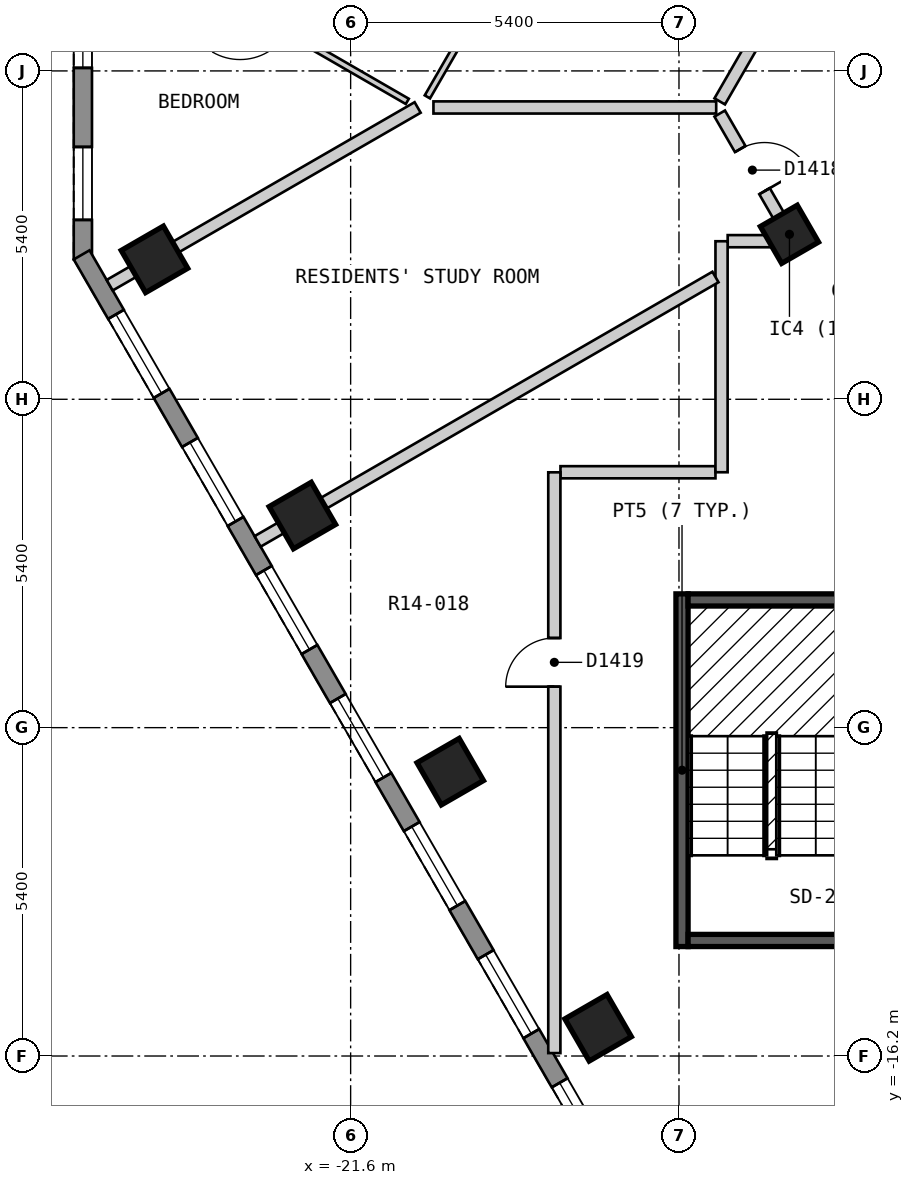
"""IFC4 building model, lengths in metres.
Left out: names, types, materials, properties, quantities, classifications, styles, units other than length and angle.
Written with IfcOpenShell. Run it as: python <this file> out.ifc"""

import sys

from ifc_helpers import new_model, si_unit, direction, frame, frame_2d, origin, origin_2d, place, context, subcontext, project, spatial, polyline, rectangle, outline, extrude, element, fill, save


model = new_model("IFC4")
c1 = context("Model", 3, precision=1e-05, world=origin(), true_north=direction((0.0, 1.0)))
c2 = subcontext(c1, "Body", "Model", "MODEL_VIEW")
j1 = project(units=[si_unit("LENGTHUNIT", "METRE"), si_unit("PLANEANGLEUNIT", "RADIAN")], contexts=[c1])
p1 = place(None, origin())
s1 = spatial("IfcSite", under=j1, at=p1, CompositionType="ELEMENT")
p2 = place(p1, origin())
s2 = spatial("IfcBuilding", under=s1, at=p2, CompositionType="ELEMENT")
p3 = place(p2, frame((0.0, 0.0, 166.2)))
s3 = spatial("IfcBuildingStorey", under=s2, at=p3, CompositionType="ELEMENT", Elevation=166.2)
for number, where, z_axis, x_axis in (
    (1, (-24.826, -3.099, 0.0), (0.0, 0.0, 1.0), (0.5, -0.866, 0.0)),
    (2, (-22.394, -7.312, 0.0), (0.0, 0.0, 1.0), (0.5, -0.866, 0.0)),
    (3, (-19.962, -11.524, 0.0), (0.0, 0.0, 1.0), (0.5, -0.866, 0.0)),
    (4, (-17.53, -15.736, 0.0), (0.0, 0.0, 1.0), (0.5, -0.866, 0.0)),
):
    element("IfcColumn", number, at=place(p3, frame(where, z_axis=z_axis, x_axis=x_axis)), inside=s3, PredefinedType="COLUMN", context=c2, shape_type="SweptSolid", body=[
        extrude(rectangle(XDim=0.8, YDim=0.8, at=origin_2d()), origin(), (0.0, 0.0, 1.0), 3.0),
    ])
p4 = place(p3, frame((-14.383, -2.687, 0.0), z_axis=(0.0, 0.0, 1.0), x_axis=(0.5, -0.866025403784, 0.0)))
e5 = element("IfcColumn", 5, at=p4, inside=s3, PredefinedType="COLUMN", context=c2, shape_type="SweptSolid", body=[
    extrude(rectangle(XDim=0.7, YDim=0.7, at=origin_2d()), origin(), (0.0, 0.0, 1.0), 3.0),
])
p5 = place(p3, frame((-26.004, 1.9, 0.0), z_axis=(0.0, 0.0, 1.0), x_axis=(0.0, -1.0, 0.0)))
e6 = element("IfcWall", 6, at=p5, inside=s3, PredefinedType="SOLIDWALL", context=c2, shape_type="SweptSolid", body=[
    extrude(outline(polyline([(0.0, -0.15), (5.0, -0.15), (4.92, 0.15), (0.08, 0.15), (0.0, -0.15)])), origin(), (0.0, 0.0, 1.0), 2.7),
])
p6 = place(p5, frame((0.65, 0.0, 0.15)))
e7 = element("IfcOpeningElement", 7, at=p6, cuts=e6, PredefinedType="OPENING", context=c2, shape_type="SweptSolid", body=[
    extrude(rectangle(XDim=1.2, YDim=2.1, at=frame_2d((0.6, 1.05))), frame((0.0, 0.16, 0.0), z_axis=(0.0, -1.0, 0.0), x_axis=(1.0, 0.0, 0.0)), (0.0, 0.0, 1.0), 0.32),
])
p7 = place(p5, frame((3.15, 0.0, 0.15)))
e8 = element("IfcOpeningElement", 8, at=p7, cuts=e6, PredefinedType="OPENING", context=c2, shape_type="SweptSolid", body=[
    extrude(rectangle(XDim=1.2, YDim=2.1, at=frame_2d((0.6, 1.05))), frame((0.0, 0.16, 0.0), z_axis=(0.0, -1.0, 0.0), x_axis=(1.0, 0.0, 0.0)), (0.0, 0.0, 1.0), 0.32),
])
p8 = place(p3, frame((-26.024, -3.025, 0.0), z_axis=(0.0, 0.0, 1.0), x_axis=(0.500018670445, -0.86601462413, 0.0)))
e9 = element("IfcWall", 9, at=p8, inside=s3, PredefinedType="SOLIDWALL", context=c2, shape_type="SweptSolid", body=[
    extrude(outline(polyline([(0.0, -0.15), (20.785, -0.15), (20.705, 0.15), (0.08, 0.15), (0.0, -0.15)])), origin(), (0.0, 0.0, 1.0), 2.7),
])
p9 = place(p8, frame((1.13, 0.0, 0.15)))
e10 = element("IfcOpeningElement", 10, at=p9, cuts=e9, PredefinedType="OPENING", context=c2, shape_type="SweptSolid", body=[
    extrude(rectangle(XDim=1.5, YDim=2.1, at=frame_2d((0.75, 1.05))), frame((0.0, 0.16, 0.0), z_axis=(0.0, -1.0, 0.0), x_axis=(1.0, 0.0, 0.0)), (0.0, 0.0, 1.0), 0.32),
])
p10 = place(p8, frame((3.562, 0.0, 0.15)))
e11 = element("IfcOpeningElement", 11, at=p10, cuts=e9, PredefinedType="OPENING", context=c2, shape_type="SweptSolid", body=[
    extrude(rectangle(XDim=1.5, YDim=2.1, at=frame_2d((0.75, 1.05))), frame((0.0, 0.16, 0.0), z_axis=(0.0, -1.0, 0.0), x_axis=(1.0, 0.0, 0.0)), (0.0, 0.0, 1.0), 0.32),
])
p11 = place(p8, frame((5.994, 0.0, 0.15)))
e12 = element("IfcOpeningElement", 12, at=p11, cuts=e9, PredefinedType="OPENING", context=c2, shape_type="SweptSolid", body=[
    extrude(rectangle(XDim=1.5, YDim=2.1, at=frame_2d((0.75, 1.05))), frame((0.0, 0.16, 0.0), z_axis=(0.0, -1.0, 0.0), x_axis=(1.0, 0.0, 0.0)), (0.0, 0.0, 1.0), 0.32),
])
p12 = place(p8, frame((8.425, 0.0, 0.15)))
e13 = element("IfcOpeningElement", 13, at=p12, cuts=e9, PredefinedType="OPENING", context=c2, shape_type="SweptSolid", body=[
    extrude(rectangle(XDim=1.5, YDim=2.1, at=frame_2d((0.75, 1.05))), frame((0.0, 0.16, 0.0), z_axis=(0.0, -1.0, 0.0), x_axis=(1.0, 0.0, 0.0)), (0.0, 0.0, 1.0), 0.32),
])
p13 = place(p8, frame((10.857, 0.0, 0.15)))
e14 = element("IfcOpeningElement", 14, at=p13, cuts=e9, PredefinedType="OPENING", context=c2, shape_type="SweptSolid", body=[
    extrude(rectangle(XDim=1.5, YDim=2.1, at=frame_2d((0.75, 1.05))), frame((0.0, 0.16, 0.0), z_axis=(0.0, -1.0, 0.0), x_axis=(1.0, 0.0, 0.0)), (0.0, 0.0, 1.0), 0.32),
])
p14 = place(p8, frame((13.289, 0.0, 0.15)))
e15 = element("IfcOpeningElement", 15, at=p14, cuts=e9, PredefinedType="OPENING", context=c2, shape_type="SweptSolid", body=[
    extrude(rectangle(XDim=1.5, YDim=2.1, at=frame_2d((0.75, 1.05))), frame((0.0, 0.16, 0.0), z_axis=(0.0, -1.0, 0.0), x_axis=(1.0, 0.0, 0.0)), (0.0, 0.0, 1.0), 0.32),
])
p15 = place(p8, frame((15.722, 0.0, 0.15)))
e16 = element("IfcOpeningElement", 16, at=p15, cuts=e9, PredefinedType="OPENING", context=c2, shape_type="SweptSolid", body=[
    extrude(rectangle(XDim=1.5, YDim=2.1, at=frame_2d((0.75, 1.05))), frame((0.0, 0.16, 0.0), z_axis=(0.0, -1.0, 0.0), x_axis=(1.0, 0.0, 0.0)), (0.0, 0.0, 1.0), 0.32),
])
p16 = place(p8, frame((18.154, 0.0, 0.15)))
e17 = element("IfcOpeningElement", 17, at=p16, cuts=e9, PredefinedType="OPENING", context=c2, shape_type="SweptSolid", body=[
    extrude(rectangle(XDim=1.5, YDim=2.1, at=frame_2d((0.75, 1.05))), frame((0.0, 0.16, 0.0), z_axis=(0.0, -1.0, 0.0), x_axis=(1.0, 0.0, 0.0)), (0.0, 0.0, 1.0), 0.32),
])
p17 = place(p3, frame((-15.53, -0.701, 0.0), z_axis=(0.0, 0.0, 1.0), x_axis=(0.499972710878, -0.866041158593, 0.0)))
e18 = element("IfcWall", 18, at=p17, inside=s3, PredefinedType="PARTITIONING", context=c2, shape_type="SweptSolid", body=[
    extrude(rectangle(XDim=2.308, YDim=0.2, at=frame_2d((1.154, 0.0))), origin(), (0.0, 0.0, 1.0), 2.7),
])
p18 = place(p17, frame((0.674, 0.0, 0.0)))
e19 = element("IfcOpeningElement", 19, at=p18, cuts=e18, PredefinedType="OPENING", context=c2, shape_type="SweptSolid", body=[
    extrude(rectangle(XDim=0.8, YDim=2.1, at=frame_2d((0.4, 1.05))), frame((0.0, 0.11, 0.0), z_axis=(0.0, -1.0, 0.0), x_axis=(1.0, 0.0, 0.0)), (0.0, 0.0, 1.0), 0.22),
])
p19 = place(p3, frame((-18.149, -6.6, 0.0), z_axis=(0.0, 0.0, 1.0), x_axis=(1.0, 0.0, 0.0)))
e20 = element("IfcWall", 20, at=p19, inside=s3, PredefinedType="PARTITIONING", context=c2, shape_type="SweptSolid", body=[
    extrude(rectangle(XDim=2.549, YDim=0.2, at=frame_2d((1.274, 0.0))), origin(), (0.0, 0.0, 1.0), 2.7),
])
p20 = place(p3, frame((-15.399, -2.8, 0.0), z_axis=(0.0, 0.0, 1.0), x_axis=(1.0, 0.0, 0.0)))
e21 = element("IfcWall", 21, at=p20, inside=s3, PredefinedType="PARTITIONING", context=c2, shape_type="SweptSolid", body=[
    extrude(rectangle(XDim=1.081, YDim=0.2, at=frame_2d((0.541, 0.0))), origin(), (0.0, 0.0, 1.0), 2.7),
])
p21 = place(p3, frame((-15.53, -0.501, 0.0), z_axis=(0.0, 0.0, 1.0), x_axis=(0.499952498232, 0.866052827206, 0.0)))
e22 = element("IfcWall", 22, at=p21, inside=s3, PredefinedType="PARTITIONING", context=c2, shape_type="SweptSolid", body=[
    extrude(rectangle(XDim=9.585, YDim=0.2, at=frame_2d((4.792, 0.0))), origin(), (0.0, 0.0, 1.0), 2.7),
])
p22 = place(p3, frame((-15.5, -6.6, 0.0), z_axis=(0.0, 0.0, 1.0), x_axis=(0.0, 1.0, 0.0)))
e23 = element("IfcWall", 23, at=p22, inside=s3, PredefinedType="PARTITIONING", context=c2, shape_type="SweptSolid", body=[
    extrude(rectangle(XDim=3.799, YDim=0.2, at=frame_2d((1.899, 0.0))), origin(), (0.0, 0.0, 1.0), 2.7),
])
p23 = place(p3, frame((-18.25, -16.152, 0.0), z_axis=(0.0, 0.0, 1.0), x_axis=(0.0, 1.0, 0.0)))
e24 = element("IfcWall", 24, at=p23, inside=s3, PredefinedType="PARTITIONING", context=c2, shape_type="SweptSolid", body=[
    extrude(rectangle(XDim=9.551, YDim=0.2, at=frame_2d((4.775, 0.0))), origin(), (0.0, 0.0, 1.0), 2.7),
])
p24 = place(p23, frame((6.026, 0.0, 0.0)))
e25 = element("IfcOpeningElement", 25, at=p24, cuts=e24, PredefinedType="OPENING", context=c2, shape_type="SweptSolid", body=[
    extrude(rectangle(XDim=0.8, YDim=2.1, at=frame_2d((0.4, 1.05))), frame((0.0, 0.11, 0.0), z_axis=(0.0, -1.0, 0.0), x_axis=(1.0, 0.0, 0.0)), (0.0, 0.0, 1.0), 0.22),
])
p25 = place(p3, frame((-25.562, 2.325, 0.0), z_axis=(0.0, 0.0, 1.0), x_axis=(0.865998530728, -0.500046542611, 0.0)))
e26 = element("IfcWall", 26, at=p25, inside=s3, PredefinedType="PARTITIONING", context=c2, shape_type="SweptSolid", body=[
    extrude(rectangle(XDim=5.651, YDim=0.1, at=frame_2d((2.826, 0.0))), origin(), (0.0, 0.0, 1.0), 2.7),
])
p26 = place(p25, frame((2.476, 0.0, 0.0)))
e27 = element("IfcOpeningElement", 27, at=p26, cuts=e26, PredefinedType="OPENING", context=c2, shape_type="SweptSolid", body=[
    extrude(rectangle(XDim=0.9, YDim=2.1, at=frame_2d((0.45, 1.05))), frame((0.0, 0.06, 0.0), z_axis=(0.0, -1.0, 0.0), x_axis=(1.0, 0.0, 0.0)), (0.0, 0.0, 1.0), 0.12),
])
p27 = place(p3, frame((-20.338, -0.427, 0.0), z_axis=(0.0, 0.0, 1.0), x_axis=(0.500069990121, 0.865984991198, 0.0)))
e28 = element("IfcWall", 28, at=p27, inside=s3, PredefinedType="PARTITIONING", context=c2, shape_type="SweptSolid", body=[
    extrude(rectangle(XDim=1.176, YDim=0.1, at=frame_2d((0.588, 0.0))), origin(), (0.0, 0.0, 1.0), 2.7),
])
p28 = place(p3, frame((-20.238, -0.601, 0.0), z_axis=(0.0, 0.0, 1.0), x_axis=(1.0, 0.0, 0.0)))
e29 = element("IfcWall", 29, at=p28, inside=s3, PredefinedType="PARTITIONING", context=c2, shape_type="SweptSolid", body=[
    extrude(rectangle(XDim=4.65, YDim=0.2, at=frame_2d((2.325, 0.0))), origin(), (0.0, 0.0, 1.0), 2.7),
])
p29 = place(p3, frame((-23.13, -7.737, 0.0), z_axis=(0.0, 0.0, 1.0), x_axis=(0.86598451299, 0.500070818246, 0.0)))
e30 = element("IfcWall", 30, at=p29, inside=s3, PredefinedType="PARTITIONING", context=c2, shape_type="SweptSolid", body=[
    extrude(rectangle(XDim=8.695, YDim=0.2, at=frame_2d((4.348, 0.0))), origin(), (0.0, 0.0, 1.0), 2.7),
])
p30 = place(p3, frame((-25.563, -3.524, 0.0), z_axis=(0.0, 0.0, 1.0), x_axis=(0.866128586522, 0.499821239653, 0.0)))
e31 = element("IfcWall", 31, at=p30, inside=s3, PredefinedType="PARTITIONING", context=c2, shape_type="SweptSolid", body=[
    extrude(rectangle(XDim=5.848, YDim=0.2, at=frame_2d((2.924, 0.0))), origin(), (0.0, 0.0, 1.0), 2.7),
])
p31 = place(p3, frame((-16.15, -14.4, 0.0), z_axis=(0.0, 0.0, 1.0), x_axis=(0.0, 1.0, 0.0)))
e32 = element("IfcWall", 32, at=p31, inside=s3, PredefinedType="SOLIDWALL", context=c2, shape_type="SweptSolid", body=[
    extrude(rectangle(XDim=5.8, YDim=0.2, at=frame_2d((2.9, 0.0))), origin(), (0.0, 0.0, 1.0), 2.7),
])
for number, where, z_axis, x_axis in (
    (33, (-16.05, -14.3, 0.0), (0.0, 0.0, 1.0), (1.0, 0.0, 0.0)),
    (34, (-16.05, -8.7, 0.0), (0.0, 0.0, 1.0), (1.0, 0.0, 0.0)),
):
    element("IfcWall", number, at=place(p3, frame(where, z_axis=z_axis, x_axis=x_axis)), inside=s3, PredefinedType="SOLIDWALL", context=c2, shape_type="SweptSolid", body=[
        extrude(rectangle(XDim=2.75, YDim=0.2, at=frame_2d((1.375, 0.0))), origin(), (0.0, 0.0, 1.0), 2.7),
    ])
p32 = place(p6, origin())
e35 = element("IfcWindow", 35, at=p32, inside=s3, PartitioningType="SINGLE_PANEL", PredefinedType="WINDOW", context=c2, shape_type="SweptSolid", body=[
    extrude(rectangle(XDim=1.2, YDim=2.1, at=frame_2d((0.6, 1.05))), frame((0.0, 0.03, 0.0), z_axis=(0.0, -1.0, 0.0), x_axis=(1.0, 0.0, 0.0)), (0.0, 0.0, 1.0), 0.06),
])
fill(e7, e35)
p33 = place(p7, origin())
e36 = element("IfcWindow", 36, at=p33, inside=s3, PartitioningType="SINGLE_PANEL", PredefinedType="WINDOW", context=c2, shape_type="SweptSolid", body=[
    extrude(rectangle(XDim=1.2, YDim=2.1, at=frame_2d((0.6, 1.05))), frame((0.0, 0.03, 0.0), z_axis=(0.0, -1.0, 0.0), x_axis=(1.0, 0.0, 0.0)), (0.0, 0.0, 1.0), 0.06),
])
fill(e8, e36)
p34 = place(p9, origin())
e37 = element("IfcWindow", 37, at=p34, inside=s3, PartitioningType="SINGLE_PANEL", PredefinedType="WINDOW", context=c2, shape_type="SweptSolid", body=[
    extrude(rectangle(XDim=1.5, YDim=2.1, at=frame_2d((0.75, 1.05))), frame((0.0, 0.03, 0.0), z_axis=(0.0, -1.0, 0.0), x_axis=(1.0, 0.0, 0.0)), (0.0, 0.0, 1.0), 0.06),
])
fill(e10, e37)
p35 = place(p10, origin())
e38 = element("IfcWindow", 38, at=p35, inside=s3, PartitioningType="SINGLE_PANEL", PredefinedType="WINDOW", context=c2, shape_type="SweptSolid", body=[
    extrude(rectangle(XDim=1.5, YDim=2.1, at=frame_2d((0.75, 1.05))), frame((0.0, 0.03, 0.0), z_axis=(0.0, -1.0, 0.0), x_axis=(1.0, 0.0, 0.0)), (0.0, 0.0, 1.0), 0.06),
])
fill(e11, e38)
p36 = place(p11, origin())
e39 = element("IfcWindow", 39, at=p36, inside=s3, PartitioningType="SINGLE_PANEL", PredefinedType="WINDOW", context=c2, shape_type="SweptSolid", body=[
    extrude(rectangle(XDim=1.5, YDim=2.1, at=frame_2d((0.75, 1.05))), frame((0.0, 0.03, 0.0), z_axis=(0.0, -1.0, 0.0), x_axis=(1.0, 0.0, 0.0)), (0.0, 0.0, 1.0), 0.06),
])
fill(e12, e39)
p37 = place(p12, origin())
e40 = element("IfcWindow", 40, at=p37, inside=s3, PartitioningType="SINGLE_PANEL", PredefinedType="WINDOW", context=c2, shape_type="SweptSolid", body=[
    extrude(rectangle(XDim=1.5, YDim=2.1, at=frame_2d((0.75, 1.05))), frame((0.0, 0.03, 0.0), z_axis=(0.0, -1.0, 0.0), x_axis=(1.0, 0.0, 0.0)), (0.0, 0.0, 1.0), 0.06),
])
fill(e13, e40)
p38 = place(p13, origin())
e41 = element("IfcWindow", 41, at=p38, inside=s3, PartitioningType="SINGLE_PANEL", PredefinedType="WINDOW", context=c2, shape_type="SweptSolid", body=[
    extrude(rectangle(XDim=1.5, YDim=2.1, at=frame_2d((0.75, 1.05))), frame((0.0, 0.03, 0.0), z_axis=(0.0, -1.0, 0.0), x_axis=(1.0, 0.0, 0.0)), (0.0, 0.0, 1.0), 0.06),
])
fill(e14, e41)
p39 = place(p14, origin())
e42 = element("IfcWindow", 42, at=p39, inside=s3, PartitioningType="SINGLE_PANEL", PredefinedType="WINDOW", context=c2, shape_type="SweptSolid", body=[
    extrude(rectangle(XDim=1.5, YDim=2.1, at=frame_2d((0.75, 1.05))), frame((0.0, 0.03, 0.0), z_axis=(0.0, -1.0, 0.0), x_axis=(1.0, 0.0, 0.0)), (0.0, 0.0, 1.0), 0.06),
])
fill(e15, e42)
p40 = place(p15, origin())
e43 = element("IfcWindow", 43, at=p40, inside=s3, PartitioningType="SINGLE_PANEL", PredefinedType="WINDOW", context=c2, shape_type="SweptSolid", body=[
    extrude(rectangle(XDim=1.5, YDim=2.1, at=frame_2d((0.75, 1.05))), frame((0.0, 0.03, 0.0), z_axis=(0.0, -1.0, 0.0), x_axis=(1.0, 0.0, 0.0)), (0.0, 0.0, 1.0), 0.06),
])
fill(e16, e43)
p41 = place(p18, origin())
e44 = element("IfcDoor", 44, at=p41, inside=s3, OperationType="SINGLE_SWING_RIGHT", PredefinedType="DOOR", context=c2, shape_type="SweptSolid", body=[
    extrude(rectangle(XDim=0.8, YDim=2.1, at=frame_2d((0.4, 1.05))), frame((0.0, 0.025, 0.0), z_axis=(0.0, -1.0, 0.0), x_axis=(1.0, 0.0, 0.0)), (0.0, 0.0, 1.0), 0.05),
])
fill(e19, e44)
p42 = place(p24, origin())
e45 = element("IfcDoor", 45, at=p42, inside=s3, OperationType="SINGLE_SWING_LEFT", PredefinedType="DOOR", context=c2, shape_type="SweptSolid", body=[
    extrude(rectangle(XDim=0.8, YDim=2.1, at=frame_2d((0.4, 1.05))), frame((0.0, 0.025, 0.0), z_axis=(0.0, -1.0, 0.0), x_axis=(1.0, 0.0, 0.0)), (0.0, 0.0, 1.0), 0.05),
])
fill(e25, e45)
save(model, sys.argv[1])
